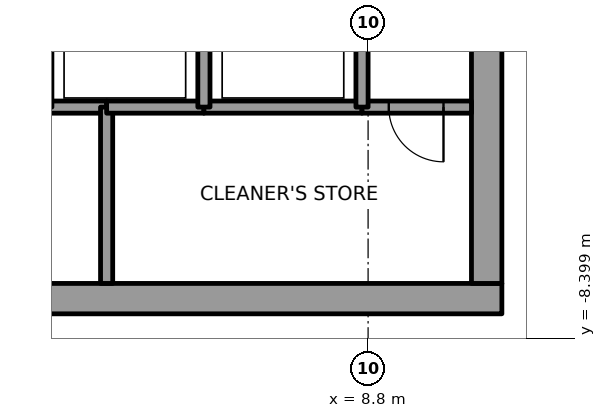
"""IFC4 building model, lengths in metres.
Left out: names, types, materials, properties, quantities, classifications, styles, units other than length and angle.
Written with IfcOpenShell. Run it as: python <this file> out.ifc"""

import sys

from ifc_helpers import new_model, si_unit, direction, frame, frame_2d, origin, place, context, subcontext, project, spatial, rectangle, extrude, element, fill, save


model = new_model("IFC4")
c1 = context("Model", 3, precision=1e-05, world=origin(), true_north=direction((0.0, 1.0)))
c2 = subcontext(c1, "Body", "Model", "MODEL_VIEW")
j1 = project(units=[si_unit("LENGTHUNIT", "METRE"), si_unit("PLANEANGLEUNIT", "RADIAN")], contexts=[c1])
p1 = place(None, origin())
s1 = spatial("IfcSite", under=j1, at=p1, CompositionType="ELEMENT")
p2 = place(p1, origin())
s2 = spatial("IfcBuilding", under=s1, at=p2, CompositionType="ELEMENT")
p3 = place(p2, frame((0.0, 0.0, 299.0)))
s3 = spatial("IfcBuildingStorey", under=s2, at=p3, CompositionType="ELEMENT", Elevation=299.0)
p4 = place(p3, frame((-11.0, -7.75, 0.0), z_axis=(0.0, 0.0, 1.0), x_axis=(1.0, 0.0, 0.0)))
e1 = element("IfcWall", 1, at=p4, inside=s3, PredefinedType="SHEAR", context=c2, shape_type="SweptSolid", body=[
    extrude(rectangle(XDim=22.0, YDim=0.5, at=frame_2d((11.0, 0.0))), origin(), (0.0, 0.0, 1.0), 4.0),
])
p5 = place(p4, frame((10.45, 0.0, 0.0)))
e2 = element("IfcOpeningElement", 2, at=p5, cuts=e1, PredefinedType="OPENING", context=c2, shape_type="SweptSolid", body=[
    extrude(rectangle(XDim=1.1, YDim=2.1, at=frame_2d((0.55, 1.05))), frame((0.0, 0.25, 0.0), z_axis=(0.0, -1.0, 0.0), x_axis=(1.0, 0.0, 0.0)), (0.0, 0.0, 1.0), 0.5),
])
p6 = place(p3, frame((10.75, -7.5, 0.0), z_axis=(0.0, 0.0, 1.0), x_axis=(0.0, 1.0, 0.0)))
e3 = element("IfcWall", 3, at=p6, inside=s3, PredefinedType="SHEAR", context=c2, shape_type="SweptSolid", body=[
    extrude(rectangle(XDim=15.0, YDim=0.5, at=frame_2d((7.5, 0.0))), origin(), (0.0, 0.0, 1.0), 4.0),
])
p7 = place(p6, frame((6.6, 0.0, 0.0)))
e4 = element("IfcOpeningElement", 4, at=p7, cuts=e3, PredefinedType="OPENING", context=c2, shape_type="SweptSolid", body=[
    extrude(rectangle(XDim=1.8, YDim=2.1, at=frame_2d((0.9, 1.05))), frame((0.0, 0.25, 0.0), z_axis=(0.0, -1.0, 0.0), x_axis=(1.0, 0.0, 0.0)), (0.0, 0.0, 1.0), 0.5),
])
p8 = place(p3, frame((4.5, -4.6, 0.0), z_axis=(0.0, 0.0, 1.0), x_axis=(-1.0, 0.0, 0.0)))
e5 = element("IfcWall", 5, at=p8, inside=s3, PredefinedType="SOLIDWALL", context=c2, shape_type="SweptSolid", body=[
    extrude(rectangle(XDim=1.0, YDim=0.2, at=frame_2d((0.5, 0.0))), origin(), (0.0, 0.0, 1.0), 3.85),
])
p9 = place(p3, frame((4.5, -4.6, 0.0), z_axis=(0.0, 0.0, 1.0), x_axis=(0.0, -1.0, 0.0)))
e6 = element("IfcWall", 6, at=p9, inside=s3, PredefinedType="SOLIDWALL", context=c2, shape_type="SweptSolid", body=[
    extrude(rectangle(XDim=2.9, YDim=0.2, at=frame_2d((1.45, 0.0))), origin(), (0.0, 0.0, 1.0), 3.85),
])
p10 = place(p3, frame((6.1, -4.6, 0.0), z_axis=(0.0, 0.0, 1.0), x_axis=(-1.0, 0.0, 0.0)))
e7 = element("IfcWall", 7, at=p10, inside=s3, PredefinedType="SOLIDWALL", context=c2, shape_type="SweptSolid", body=[
    extrude(rectangle(XDim=1.6, YDim=0.2, at=frame_2d((0.8, 0.0))), origin(), (0.0, 0.0, 1.0), 3.85),
])
p11 = place(p3, frame((8.7, -4.6, 0.0), z_axis=(0.0, 0.0, 1.0), x_axis=(-1.0, 0.0, 0.0)))
e8 = element("IfcWall", 8, at=p11, inside=s3, PredefinedType="SOLIDWALL", context=c2, shape_type="SweptSolid", body=[
    extrude(rectangle(XDim=2.6, YDim=0.2, at=frame_2d((1.3, 0.0))), origin(), (0.0, 0.0, 1.0), 3.85),
])
p12 = place(p3, frame((6.1, -4.6, 0.0), z_axis=(0.0, 0.0, 1.0), x_axis=(0.0, 1.0, 0.0)))
e9 = element("IfcWall", 9, at=p12, inside=s3, PredefinedType="SOLIDWALL", context=c2, shape_type="SweptSolid", body=[
    extrude(rectangle(XDim=2.8, YDim=0.2, at=frame_2d((1.4, 0.0))), origin(), (0.0, 0.0, 1.0), 3.85),
])
p13 = place(p3, frame((10.5, -4.6, 0.0), z_axis=(0.0, 0.0, 1.0), x_axis=(-1.0, 0.0, 0.0)))
e10 = element("IfcWall", 10, at=p13, inside=s3, PredefinedType="SOLIDWALL", context=c2, shape_type="SweptSolid", body=[
    extrude(rectangle(XDim=1.8, YDim=0.2, at=frame_2d((0.9, 0.0))), origin(), (0.0, 0.0, 1.0), 3.85),
])
p14 = place(p13, frame((0.46, 0.0, 0.0)))
e11 = element("IfcOpeningElement", 11, at=p14, cuts=e10, PredefinedType="OPENING", context=c2, shape_type="SweptSolid", body=[
    extrude(rectangle(XDim=0.9, YDim=2.1, at=frame_2d((0.45, 1.05))), frame((0.0, 0.1, 0.0), z_axis=(0.0, -1.0, 0.0), x_axis=(1.0, 0.0, 0.0)), (0.0, 0.0, 1.0), 0.2),
])
p15 = place(p3, frame((8.7, -1.8, 0.0), z_axis=(0.0, 0.0, 1.0), x_axis=(0.0, -1.0, 0.0)))
e12 = element("IfcWall", 12, at=p15, inside=s3, PredefinedType="SOLIDWALL", context=c2, shape_type="SweptSolid", body=[
    extrude(rectangle(XDim=2.8, YDim=0.2, at=frame_2d((1.4, 0.0))), origin(), (0.0, 0.0, 1.0), 3.85),
])
p16 = place(p14, origin())
e13 = element("IfcDoor", 13, at=p16, inside=s3, OperationType="SINGLE_SWING_RIGHT", PredefinedType="DOOR", context=c2, shape_type="SweptSolid", body=[
    extrude(rectangle(XDim=0.9, YDim=2.1, at=frame_2d((0.45, 1.05))), frame((0.0, 0.025, 0.0), z_axis=(0.0, -1.0, 0.0), x_axis=(1.0, 0.0, 0.0)), (0.0, 0.0, 1.0), 0.05),
])
fill(e11, e13)
save(model, sys.argv[1])
